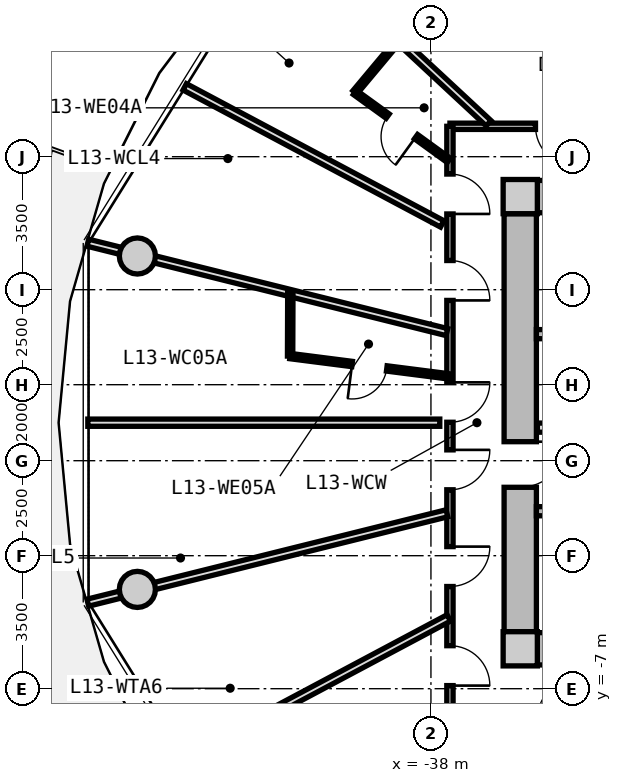
"""IFC4 building model, lengths in metres.
Left out: names, types, materials, properties, quantities, classifications, styles, units other than length and angle.
Written with IfcOpenShell. Run it as: python <this file> out.ifc"""

import sys

from ifc_helpers import new_model, si_unit, direction, frame, frame_2d, origin, origin_2d, place, context, subcontext, project, spatial, rectangle, circle, extrude, source, transform, mapped, element, fill, save


model = new_model("IFC4")
c1 = context("Model", 3, precision=1e-05, world=origin(), true_north=direction((0.0, 1.0)))
c2 = subcontext(c1, "Body", "Model", "MODEL_VIEW")
j1 = project(units=[si_unit("LENGTHUNIT", "METRE"), si_unit("PLANEANGLEUNIT", "RADIAN")], contexts=[c1])
p1 = place(None, origin())
s1 = spatial("IfcSite", under=j1, at=p1, CompositionType="ELEMENT")
p2 = place(p1, origin())
s2 = spatial("IfcBuilding", under=s1, at=p2, CompositionType="ELEMENT")
p3 = place(p2, frame((0.0, 0.0, 46.0)))
s3 = spatial("IfcBuildingStorey", under=s2, at=p3, CompositionType="ELEMENT", Elevation=46.0)
m1 = source(origin(), c2, "Body", "SweptSolid", [
    extrude(rectangle(XDim=0.9, YDim=0.9, at=origin_2d()), origin(), (0.0, 0.0, 1.0), 3.05),
])
for number, where, z_axis, x_axis in (
    (1, (-35.65, -5.95, 0.0), (0.0, 0.0, 1.0), (1.0, 0.0, 0.0)),
    (2, (-35.65, 5.95, 0.0), (0.0, 0.0, 1.0), (1.0, 0.0, 0.0)),
):
    element("IfcColumn", number, at=place(p3, frame(where, z_axis=z_axis, x_axis=x_axis)), inside=s3, PredefinedType="COLUMN", context=c2, shape_type="MappedRepresentation", body=[
        mapped(m1, transform((0.0, 0.0, 0.0), x_axis=(1.0, 0.0, 0.0), y_axis=(0.0, 1.0, 0.0), z_axis=(0.0, 0.0, 1.0), scale=1.0)),
    ])
m2 = source(origin(), c2, "Body", "SweptSolid", [
    extrude(rectangle(XDim=14.4, YDim=0.85, at=frame_2d((7.2, 0.0))), origin(), (0.0, 0.0, 1.0), 2.79),
])
for number, where, z_axis, x_axis in (
    (3, (-35.2, 5.95, 0.0), (0.0, 0.0, 1.0), (1.0, 0.0, 0.0)),
    (4, (-20.8, -5.95, 0.0), (0.0, 0.0, 1.0), (-1.0, 0.0, 0.0)),
):
    element("IfcWall", number, at=place(p3, frame(where, z_axis=z_axis, x_axis=x_axis)), inside=s3, PredefinedType="SHEAR", context=c2, shape_type="MappedRepresentation", body=[
        mapped(m2, transform((0.0, 0.0, 0.0), x_axis=(1.0, 0.0, 0.0), y_axis=(0.0, 1.0, 0.0), z_axis=(0.0, 0.0, 1.0), scale=1.0)),
    ])
m3 = source(origin(), c2, "Body", "SweptSolid", [
    extrude(rectangle(XDim=11.0, YDim=0.85, at=frame_2d((5.5, 0.0))), origin(), (0.0, 0.0, 1.0), 2.79),
])
p4 = place(p3, frame((-35.65, -5.5, 0.0), z_axis=(0.0, 0.0, 1.0), x_axis=(0.0, 1.0, 0.0)))
e5 = element("IfcWall", 5, at=p4, inside=s3, PredefinedType="SHEAR", context=c2, shape_type="MappedRepresentation", body=[
    mapped(m3, transform((0.0, 0.0, 0.0), x_axis=(1.0, 0.0, 0.0), y_axis=(0.0, 1.0, 0.0), z_axis=(0.0, 0.0, 1.0), scale=1.0)),
])
p5 = place(p4, frame((3.8, 0.0, 0.0)))
e6 = element("IfcOpeningElement", 6, at=p5, cuts=e5, PredefinedType="OPENING", context=c2, shape_type="SweptSolid", body=[
    extrude(rectangle(XDim=1.2, YDim=2.15, at=frame_2d((0.6, 1.075))), frame((0.0, 0.435, 0.0), z_axis=(0.0, -1.0, 0.0), x_axis=(1.0, 0.0, 0.0)), (0.0, 0.0, 1.0), 0.87),
])
m4 = source(origin(), c2, "Body", "SweptSolid", [
    extrude(circle(Radius=0.475, at=origin_2d()), origin(), (0.0, 0.0, 1.0), 3.05),
])
for number, where, z_axis, x_axis in (
    (7, (-45.725, 4.387, 0.0), (0.0, 0.0, 1.0), (1.0, 0.0, 0.0)),
    (8, (-45.725, -4.387, 0.0), (0.0, 0.0, 1.0), (1.0, 0.0, 0.0)),
):
    element("IfcColumn", number, at=place(p3, frame(where, z_axis=z_axis, x_axis=x_axis)), inside=s3, PredefinedType="COLUMN", context=c2, shape_type="MappedRepresentation", body=[
        mapped(m4, transform((0.0, 0.0, 0.0), x_axis=(1.0, 0.0, 0.0), y_axis=(0.0, 1.0, 0.0), z_axis=(0.0, 0.0, 1.0), scale=1.0)),
    ])
m5 = source(origin(), c2, "Body", "SweptSolid", [
    extrude(rectangle(XDim=7.765, YDim=0.24, at=frame_2d((3.883, 0.0))), origin(), (0.0, 0.0, 1.0), 2.79),
])
p6 = place(p3, frame((-35.225, 2.33, 0.0), z_axis=(0.0, 0.0, 1.0), x_axis=(1.0, 0.0, 0.0)))
e9 = element("IfcWall", 9, at=p6, inside=s3, PredefinedType="PARTITIONING", context=c2, shape_type="MappedRepresentation", body=[
    mapped(m5, transform((0.0, 0.0, 0.0), x_axis=(1.0, 0.0, 0.0), y_axis=(0.0, 1.0, 0.0), z_axis=(0.0, 0.0, 1.0), scale=1.0)),
])
p7 = place(p3, frame((-35.225, -2.33, 0.0), z_axis=(0.0, 0.0, 1.0), x_axis=(1.0, 0.0, 0.0)))
e10 = element("IfcWall", 10, at=p7, inside=s3, PredefinedType="PARTITIONING", context=c2, shape_type="MappedRepresentation", body=[
    mapped(m5, transform((0.0, 0.0, 0.0), x_axis=(1.0, 0.0, 0.0), y_axis=(0.0, 1.0, 0.0), z_axis=(0.0, 0.0, 1.0), scale=1.0)),
])
p8 = place(p7, frame((0.885, 0.0, 0.0)))
e11 = element("IfcOpeningElement", 11, at=p8, cuts=e10, PredefinedType="OPENING", context=c2, shape_type="SweptSolid", body=[
    extrude(rectangle(XDim=1.1, YDim=2.15, at=frame_2d((0.55, 1.075))), frame((0.0, 0.13, 0.0), z_axis=(0.0, -1.0, 0.0), x_axis=(1.0, 0.0, 0.0)), (0.0, 0.0, 1.0), 0.26),
])
m6 = source(origin(), c2, "Body", "SweptSolid", [
    extrude(rectangle(XDim=7.62, YDim=0.24, at=frame_2d((3.81, 0.0))), origin(), (0.0, 0.0, 1.0), 2.775),
])
p9 = place(p3, frame((-35.2, -0.13, 0.0), z_axis=(0.0, 0.0, 1.0), x_axis=(1.0, 0.0, 0.0)))
e12 = element("IfcWall", 12, at=p9, inside=s3, PredefinedType="PARTITIONING", context=c2, shape_type="MappedRepresentation", body=[
    mapped(m6, transform((0.0, 0.0, 0.0), x_axis=(1.0, 0.0, 0.0), y_axis=(0.0, 1.0, 0.0), z_axis=(0.0, 0.0, 1.0), scale=1.0)),
])
p10 = place(p9, frame((6.22, 0.0, 0.0)))
e13 = element("IfcOpeningElement", 13, at=p10, cuts=e12, PredefinedType="OPENING", context=c2, shape_type="SweptSolid", body=[
    extrude(rectangle(XDim=1.0, YDim=2.1, at=frame_2d((0.5, 1.05))), frame((0.0, 0.13, 0.0), z_axis=(0.0, -1.0, 0.0), x_axis=(1.0, 0.0, 0.0)), (0.0, 0.0, 1.0), 0.26),
])
p11 = place(p9, frame((0.85, 0.0, 0.0)))
e14 = element("IfcOpeningElement", 14, at=p11, cuts=e12, PredefinedType="OPENING", context=c2, shape_type="SweptSolid", body=[
    extrude(rectangle(XDim=1.1, YDim=2.2, at=frame_2d((0.55, 1.1))), frame((0.0, 0.13, 0.0), z_axis=(0.0, -1.0, 0.0), x_axis=(1.0, 0.0, 0.0)), (0.0, 0.0, 1.0), 0.26),
])
p12 = place(p9, frame((3.85, 0.0, 0.0)))
e15 = element("IfcOpeningElement", 15, at=p12, cuts=e12, PredefinedType="OPENING", context=c2, shape_type="SweptSolid", body=[
    extrude(rectangle(XDim=1.1, YDim=2.2, at=frame_2d((0.55, 1.1))), frame((0.0, 0.13, 0.0), z_axis=(0.0, -1.0, 0.0), x_axis=(1.0, 0.0, 0.0)), (0.0, 0.0, 1.0), 0.26),
])
m7 = source(origin(), c2, "Body", "SweptSolid", [
    extrude(rectangle(XDim=19.0, YDim=0.165, at=frame_2d((9.5, 0.0))), origin(), (0.0, 0.0, 1.0), 2.775),
])
p13 = place(p3, frame((-37.5, 7.8, 0.0), z_axis=(0.0, 0.0, 1.0), x_axis=(1.0, 0.0, 0.0)))
e16 = element("IfcWall", 16, at=p13, inside=s3, PredefinedType="PARTITIONING", context=c2, shape_type="MappedRepresentation", body=[
    mapped(m7, transform((0.0, 0.0, 0.0), x_axis=(1.0, 0.0, 0.0), y_axis=(0.0, 1.0, 0.0), z_axis=(0.0, 0.0, 1.0), scale=1.0)),
])
p14 = place(p13, frame((4.773, 0.0, 0.0)))
e17 = element("IfcOpeningElement", 17, at=p14, cuts=e16, PredefinedType="OPENING", context=c2, shape_type="SweptSolid", body=[
    extrude(rectangle(XDim=1.05, YDim=2.15, at=frame_2d((0.525, 1.075))), frame((0.0, 0.093, 0.0), z_axis=(0.0, -1.0, 0.0), x_axis=(1.0, 0.0, 0.0)), (0.0, 0.0, 1.0), 0.185),
])
p15 = place(p13, frame((2.251, 0.0, 0.0)))
e18 = element("IfcOpeningElement", 18, at=p15, cuts=e16, PredefinedType="OPENING", context=c2, shape_type="SweptSolid", body=[
    extrude(rectangle(XDim=1.05, YDim=2.15, at=frame_2d((0.525, 1.075))), frame((0.0, 0.093, 0.0), z_axis=(0.0, -1.0, 0.0), x_axis=(1.0, 0.0, 0.0)), (0.0, 0.0, 1.0), 0.185),
])
p16 = place(p13, frame((14.653, 0.0, 0.0)))
e19 = element("IfcOpeningElement", 19, at=p16, cuts=e16, PredefinedType="OPENING", context=c2, shape_type="SweptSolid", body=[
    extrude(rectangle(XDim=1.05, YDim=2.15, at=frame_2d((0.525, 1.075))), frame((0.0, 0.093, 0.0), z_axis=(0.0, -1.0, 0.0), x_axis=(1.0, 0.0, 0.0)), (0.0, 0.0, 1.0), 0.185),
])
p17 = place(p13, frame((12.5, 0.0, 0.0)))
e20 = element("IfcOpeningElement", 20, at=p17, cuts=e16, PredefinedType="OPENING", context=c2, shape_type="SweptSolid", body=[
    extrude(rectangle(XDim=1.05, YDim=2.15, at=frame_2d((0.525, 1.075))), frame((0.0, 0.093, 0.0), z_axis=(0.0, -1.0, 0.0), x_axis=(1.0, 0.0, 0.0)), (0.0, 0.0, 1.0), 0.185),
])
p18 = place(p13, frame((9.352, 0.0, 0.0)))
e21 = element("IfcOpeningElement", 21, at=p18, cuts=e16, PredefinedType="OPENING", context=c2, shape_type="SweptSolid", body=[
    extrude(rectangle(XDim=1.05, YDim=2.15, at=frame_2d((0.525, 1.075))), frame((0.0, 0.093, 0.0), z_axis=(0.0, -1.0, 0.0), x_axis=(1.0, 0.0, 0.0)), (0.0, 0.0, 1.0), 0.185),
])
p19 = place(p13, frame((7.806, 0.0, 0.0)))
e22 = element("IfcOpeningElement", 22, at=p19, cuts=e16, PredefinedType="OPENING", context=c2, shape_type="SweptSolid", body=[
    extrude(rectangle(XDim=1.05, YDim=2.15, at=frame_2d((0.525, 1.075))), frame((0.0, 0.093, 0.0), z_axis=(0.0, -1.0, 0.0), x_axis=(1.0, 0.0, 0.0)), (0.0, 0.0, 1.0), 0.185),
])
m8 = source(origin(), c2, "Body", "SweptSolid", [
    extrude(rectangle(XDim=15.6, YDim=0.165, at=frame_2d((7.8, 0.0))), origin(), (0.0, 0.0, 1.0), 2.775),
])
p20 = place(p3, frame((-37.5, -7.8, 0.0), z_axis=(0.0, 0.0, 1.0), x_axis=(0.0, 1.0, 0.0)))
e23 = element("IfcWall", 23, at=p20, inside=s3, PredefinedType="PARTITIONING", context=c2, shape_type="MappedRepresentation", body=[
    mapped(m8, transform((0.0, 0.0, 0.0), x_axis=(1.0, 0.0, 0.0), y_axis=(0.0, 1.0, 0.0), z_axis=(0.0, 0.0, 1.0), scale=1.0)),
])
p21 = place(p20, frame((13.293, 0.0, 0.0)))
e24 = element("IfcOpeningElement", 24, at=p21, cuts=e23, PredefinedType="OPENING", context=c2, shape_type="SweptSolid", body=[
    extrude(rectangle(XDim=1.05, YDim=2.15, at=frame_2d((0.525, 1.075))), frame((0.0, 0.093, 0.0), z_axis=(0.0, -1.0, 0.0), x_axis=(1.0, 0.0, 0.0)), (0.0, 0.0, 1.0), 0.185),
])
p22 = place(p20, frame((11.018, 0.0, 0.0)))
e25 = element("IfcOpeningElement", 25, at=p22, cuts=e23, PredefinedType="OPENING", context=c2, shape_type="SweptSolid", body=[
    extrude(rectangle(XDim=1.05, YDim=2.15, at=frame_2d((0.525, 1.075))), frame((0.0, 0.093, 0.0), z_axis=(0.0, -1.0, 0.0), x_axis=(1.0, 0.0, 0.0)), (0.0, 0.0, 1.0), 0.185),
])
p23 = place(p20, frame((7.812, 0.0, 0.0)))
e26 = element("IfcOpeningElement", 26, at=p23, cuts=e23, PredefinedType="OPENING", context=c2, shape_type="SweptSolid", body=[
    extrude(rectangle(XDim=1.05, YDim=2.15, at=frame_2d((0.525, 1.075))), frame((0.0, 0.093, 0.0), z_axis=(0.0, -1.0, 0.0), x_axis=(1.0, 0.0, 0.0)), (0.0, 0.0, 1.0), 0.185),
])
p24 = place(p20, frame((6.035, 0.0, 0.0)))
e27 = element("IfcOpeningElement", 27, at=p24, cuts=e23, PredefinedType="OPENING", context=c2, shape_type="SweptSolid", body=[
    extrude(rectangle(XDim=1.05, YDim=2.15, at=frame_2d((0.525, 1.075))), frame((0.0, 0.093, 0.0), z_axis=(0.0, -1.0, 0.0), x_axis=(1.0, 0.0, 0.0)), (0.0, 0.0, 1.0), 0.185),
])
p25 = place(p20, frame((3.489, 0.0, 0.0)))
e28 = element("IfcOpeningElement", 28, at=p25, cuts=e23, PredefinedType="OPENING", context=c2, shape_type="SweptSolid", body=[
    extrude(rectangle(XDim=1.05, YDim=2.15, at=frame_2d((0.525, 1.075))), frame((0.0, 0.093, 0.0), z_axis=(0.0, -1.0, 0.0), x_axis=(1.0, 0.0, 0.0)), (0.0, 0.0, 1.0), 0.185),
])
p26 = place(p20, frame((0.882, 0.0, 0.0)))
e29 = element("IfcOpeningElement", 29, at=p26, cuts=e23, PredefinedType="OPENING", context=c2, shape_type="SweptSolid", body=[
    extrude(rectangle(XDim=1.05, YDim=2.15, at=frame_2d((0.525, 1.075))), frame((0.0, 0.093, 0.0), z_axis=(0.0, -1.0, 0.0), x_axis=(1.0, 0.0, 0.0)), (0.0, 0.0, 1.0), 0.185),
])
m9 = source(origin(), c2, "Body", "SweptSolid", [
    extrude(rectangle(XDim=7.435, YDim=0.19, at=frame_2d((3.717, 0.0))), origin(), (0.0, 0.0, 1.0), 2.225),
])
p27 = place(p3, frame((-36.483, 7.88, 0.0), z_axis=(0.0, 0.0, 1.0), x_axis=(-0.732651956848, 0.680603489652, 0.0)))
e30 = element("IfcWall", 30, at=p27, inside=s3, PredefinedType="PARTITIONING", context=c2, shape_type="MappedRepresentation", body=[
    mapped(m9, transform((0.0, 0.0, 0.0), x_axis=(1.0, 0.0, 0.0), y_axis=(0.0, 1.0, 0.0), z_axis=(0.0, 0.0, 1.0), scale=1.0)),
])
m10 = source(origin(), c2, "Body", "SweptSolid", [
    extrude(rectangle(XDim=8.598, YDim=0.19, at=frame_2d((4.299, 0.0))), origin(), (0.0, 0.0, 1.0), 2.775),
])
p28 = place(p3, frame((-32.957, 8.017, 0.0), z_axis=(0.0, 0.0, 1.0), x_axis=(-0.530039776395, 0.847972779893, 0.0)))
e31 = element("IfcWall", 31, at=p28, inside=s3, PredefinedType="PARTITIONING", context=c2, shape_type="MappedRepresentation", body=[
    mapped(m10, transform((0.0, 0.0, 0.0), x_axis=(1.0, 0.0, 0.0), y_axis=(0.0, 1.0, 0.0), z_axis=(0.0, 0.0, 1.0), scale=1.0)),
])
m11 = source(origin(), c2, "Body", "SweptSolid", [
    extrude(rectangle(XDim=9.737, YDim=0.19, at=frame_2d((4.869, 0.0))), origin(), (0.0, 0.0, 1.0), 2.225),
])
p29 = place(p3, frame((-37.58, 2.385, 0.0), z_axis=(0.0, 0.0, 1.0), x_axis=(-0.970392716238, 0.241532557375, 0.0)))
e32 = element("IfcWall", 32, at=p29, inside=s3, PredefinedType="PARTITIONING", context=c2, shape_type="MappedRepresentation", body=[
    mapped(m11, transform((0.0, 0.0, 0.0), x_axis=(1.0, 0.0, 0.0), y_axis=(0.0, 1.0, 0.0), z_axis=(0.0, 0.0, 1.0), scale=1.0)),
])
m12 = source(origin(), c2, "Body", "SweptSolid", [
    extrude(rectangle(XDim=7.677, YDim=0.19, at=frame_2d((3.838, 0.0))), origin(), (0.0, 0.0, 1.0), 2.775),
])
p30 = place(p3, frame((-37.703, 5.231, 0.0), z_axis=(0.0, 0.0, 1.0), x_axis=(-0.882725057546, 0.469889851753, 0.0)))
e33 = element("IfcWall", 33, at=p30, inside=s3, PredefinedType="PARTITIONING", context=c2, shape_type="MappedRepresentation", body=[
    mapped(m12, transform((0.0, 0.0, 0.0), x_axis=(1.0, 0.0, 0.0), y_axis=(0.0, 1.0, 0.0), z_axis=(0.0, 0.0, 1.0), scale=1.0)),
])
m13 = source(origin(), c2, "Body", "SweptSolid", [
    extrude(rectangle(XDim=3.051, YDim=0.14, at=frame_2d((1.525, 0.0))), origin(), (0.0, 0.0, 1.0), 2.775),
])
p31 = place(p3, frame((-37.53, 6.903, 0.0), z_axis=(0.0, 0.0, 1.0), x_axis=(-0.809849031404, 0.586638343729, 0.0)))
e34 = element("IfcWall", 34, at=p31, inside=s3, PredefinedType="PARTITIONING", context=c2, shape_type="MappedRepresentation", body=[
    mapped(m13, transform((0.0, 0.0, 0.0), x_axis=(1.0, 0.0, 0.0), y_axis=(0.0, 1.0, 0.0), z_axis=(0.0, 0.0, 1.0), scale=1.0)),
])
p32 = place(p31, frame((1.065, 0.0, 0.0)))
e35 = element("IfcOpeningElement", 35, at=p32, cuts=e34, PredefinedType="OPENING", context=c2, shape_type="SweptSolid", body=[
    extrude(rectangle(XDim=0.92, YDim=2.1, at=frame_2d((0.46, 1.05))), frame((0.0, 0.08, 0.0), z_axis=(0.0, -1.0, 0.0), x_axis=(1.0, 0.0, 0.0)), (0.0, 0.0, 1.0), 0.16),
])
m14 = source(origin(), c2, "Body", "SweptSolid", [
    extrude(rectangle(XDim=1.84, YDim=0.14, at=frame_2d((0.92, 0.0))), origin(), (0.0, 0.0, 1.0), 2.415),
])
p33 = place(p3, frame((-40.0, 8.692, 0.0), z_axis=(0.0, 0.0, 1.0), x_axis=(0.641410397049, 0.767197955262, 0.0)))
e36 = element("IfcWall", 36, at=p33, inside=s3, PredefinedType="PARTITIONING", context=c2, shape_type="MappedRepresentation", body=[
    mapped(m14, transform((0.0, 0.0, 0.0), x_axis=(1.0, 0.0, 0.0), y_axis=(0.0, 1.0, 0.0), z_axis=(0.0, 0.0, 1.0), scale=1.0)),
])
p34 = place(p3, frame((-37.58, -2.385, 0.0), z_axis=(0.0, 0.0, 1.0), x_axis=(-0.970392716238, -0.241532557375, 0.0)))
e37 = element("IfcWall", 37, at=p34, inside=s3, PredefinedType="PARTITIONING", context=c2, shape_type="MappedRepresentation", body=[
    mapped(m11, transform((0.0, 0.0, 0.0), x_axis=(1.0, 0.0, 0.0), y_axis=(0.0, 1.0, 0.0), z_axis=(0.0, 0.0, 1.0), scale=1.0)),
])
m15 = source(origin(), c2, "Body", "SweptSolid", [
    extrude(rectangle(XDim=9.261, YDim=0.19, at=frame_2d((4.631, 0.0))), origin(), (0.0, 0.0, 1.0), 2.775),
])
p35 = place(p3, frame((-37.767, 0.0, 0.0), z_axis=(0.0, 0.0, 1.0), x_axis=(-1.0, 0.0, 0.0)))
e38 = element("IfcWall", 38, at=p35, inside=s3, PredefinedType="PARTITIONING", context=c2, shape_type="MappedRepresentation", body=[
    mapped(m15, transform((0.0, 0.0, 0.0), x_axis=(1.0, 0.0, 0.0), y_axis=(0.0, 1.0, 0.0), z_axis=(0.0, 0.0, 1.0), scale=1.0)),
])
m16 = source(origin(), c2, "Body", "SweptSolid", [
    extrude(rectangle(XDim=4.21, YDim=0.14, at=frame_2d((2.105, 0.0))), origin(), (0.0, 0.0, 1.0), 2.775),
])
p36 = place(p3, frame((-37.53, 1.219, 0.0), z_axis=(0.0, 0.0, 1.0), x_axis=(-0.991917821325, 0.126881975625, 0.0)))
e39 = element("IfcWall", 39, at=p36, inside=s3, PredefinedType="PARTITIONING", context=c2, shape_type="MappedRepresentation", body=[
    mapped(m16, transform((0.0, 0.0, 0.0), x_axis=(1.0, 0.0, 0.0), y_axis=(0.0, 1.0, 0.0), z_axis=(0.0, 0.0, 1.0), scale=1.0)),
])
p37 = place(p36, frame((1.645, 0.0, 0.0)))
e40 = element("IfcOpeningElement", 40, at=p37, cuts=e39, PredefinedType="OPENING", context=c2, shape_type="SweptSolid", body=[
    extrude(rectangle(XDim=0.92, YDim=2.1, at=frame_2d((0.46, 1.05))), frame((0.0, 0.08, 0.0), z_axis=(0.0, -1.0, 0.0), x_axis=(1.0, 0.0, 0.0)), (0.0, 0.0, 1.0), 0.16),
])
m17 = source(origin(), c2, "Body", "SweptSolid", [
    extrude(rectangle(XDim=1.675, YDim=0.14, at=frame_2d((0.837, 0.0))), origin(), (0.0, 0.0, 1.0), 2.775),
])
p38 = place(p3, frame((-41.706, 1.753, 0.0), z_axis=(0.0, 0.0, 1.0), x_axis=(0.003644821977, 0.999993357614, 0.0)))
e41 = element("IfcWall", 41, at=p38, inside=s3, PredefinedType="PARTITIONING", context=c2, shape_type="MappedRepresentation", body=[
    mapped(m17, transform((0.0, 0.0, 0.0), x_axis=(1.0, 0.0, 0.0), y_axis=(0.0, 1.0, 0.0), z_axis=(0.0, 0.0, 1.0), scale=1.0)),
])
m18 = source(origin(), c2, "Body", "SweptSolid", [
    extrude(rectangle(XDim=7.873, YDim=0.19, at=frame_2d((3.937, 0.0))), origin(), (0.0, 0.0, 1.0), 2.775),
])
p39 = place(p3, frame((-37.53, -5.138, 0.0), z_axis=(0.0, 0.0, 1.0), x_axis=(-0.882666052726, -0.470000680175, 0.0)))
e42 = element("IfcWall", 42, at=p39, inside=s3, PredefinedType="PARTITIONING", context=c2, shape_type="MappedRepresentation", body=[
    mapped(m18, transform((0.0, 0.0, 0.0), x_axis=(1.0, 0.0, 0.0), y_axis=(0.0, 1.0, 0.0), z_axis=(0.0, 0.0, 1.0), scale=1.0)),
])
m19 = source(origin(), c2, "Body", "SweptSolid", [
    extrude(rectangle(XDim=1.2, YDim=2.15, at=frame_2d((0.6, 1.075))), frame((0.0, 0.025, 0.0), z_axis=(0.0, -1.0, 0.0), x_axis=(1.0, 0.0, 0.0)), (0.0, 0.0, 1.0), 0.05),
])
p40 = place(p5, frame((1.2, 0.0, 0.0), z_axis=(0.0, 0.0, 1.0), x_axis=(-1.0, 0.0, 0.0)))
e43 = element("IfcDoor", 43, at=p40, inside=s3, OperationType="SINGLE_SWING_LEFT", PredefinedType="DOOR", context=c2, shape_type="MappedRepresentation", body=[
    mapped(m19, transform((0.0, 0.0, 0.0), x_axis=(1.0, 0.0, 0.0), y_axis=(0.0, 1.0, 0.0), z_axis=(0.0, 0.0, 1.0), scale=1.0)),
])
fill(e6, e43)
m20 = source(origin(), c2, "Body", "SweptSolid", [
    extrude(rectangle(XDim=1.05, YDim=2.15, at=frame_2d((0.525, 1.075))), frame((0.0, 0.025, 0.0), z_axis=(0.0, -1.0, 0.0), x_axis=(1.0, 0.0, 0.0)), (0.0, 0.0, 1.0), 0.05),
])
p41 = place(p15, frame((1.05, 0.0, 0.0), z_axis=(0.0, 0.0, 1.0), x_axis=(-1.0, 0.0, 0.0)))
e44 = element("IfcDoor", 44, at=p41, inside=s3, OperationType="SINGLE_SWING_LEFT", PredefinedType="DOOR", context=c2, shape_type="MappedRepresentation", body=[
    mapped(m20, transform((0.0, 0.0, 0.0), x_axis=(1.0, 0.0, 0.0), y_axis=(0.0, 1.0, 0.0), z_axis=(0.0, 0.0, 1.0), scale=1.0)),
])
fill(e18, e44)
p42 = place(p21, frame((1.05, 0.0, 0.0), z_axis=(0.0, 0.0, 1.0), x_axis=(-1.0, 0.0, 0.0)))
e45 = element("IfcDoor", 45, at=p42, inside=s3, OperationType="SINGLE_SWING_RIGHT", PredefinedType="DOOR", context=c2, shape_type="MappedRepresentation", body=[
    mapped(m20, transform((0.0, 0.0, 0.0), x_axis=(1.0, 0.0, 0.0), y_axis=(0.0, 1.0, 0.0), z_axis=(0.0, 0.0, 1.0), scale=1.0)),
])
fill(e24, e45)
m21 = source(origin(), c2, "Body", "SweptSolid", [
    extrude(rectangle(XDim=0.92, YDim=2.1, at=frame_2d((0.46, 1.05))), frame((0.0, 0.025, 0.0), z_axis=(0.0, -1.0, 0.0), x_axis=(1.0, 0.0, 0.0)), (0.0, 0.0, 1.0), 0.05),
])
p43 = place(p32, origin())
e46 = element("IfcDoor", 46, at=p43, inside=s3, OperationType="SINGLE_SWING_LEFT", PredefinedType="DOOR", context=c2, shape_type="MappedRepresentation", body=[
    mapped(m21, transform((0.0, 0.0, 0.0), x_axis=(1.0, 0.0, 0.0), y_axis=(0.0, 1.0, 0.0), z_axis=(0.0, 0.0, 1.0), scale=1.0)),
])
fill(e35, e46)
p44 = place(p22, frame((1.05, 0.0, 0.0), z_axis=(0.0, 0.0, 1.0), x_axis=(-1.0, 0.0, 0.0)))
e47 = element("IfcDoor", 47, at=p44, inside=s3, OperationType="SINGLE_SWING_RIGHT", PredefinedType="DOOR", context=c2, shape_type="MappedRepresentation", body=[
    mapped(m20, transform((0.0, 0.0, 0.0), x_axis=(1.0, 0.0, 0.0), y_axis=(0.0, 1.0, 0.0), z_axis=(0.0, 0.0, 1.0), scale=1.0)),
])
fill(e25, e47)
p45 = place(p23, frame((1.05, 0.0, 0.0), z_axis=(0.0, 0.0, 1.0), x_axis=(-1.0, 0.0, 0.0)))
e48 = element("IfcDoor", 48, at=p45, inside=s3, OperationType="SINGLE_SWING_LEFT", PredefinedType="DOOR", context=c2, shape_type="MappedRepresentation", body=[
    mapped(m20, transform((0.0, 0.0, 0.0), x_axis=(1.0, 0.0, 0.0), y_axis=(0.0, 1.0, 0.0), z_axis=(0.0, 0.0, 1.0), scale=1.0)),
])
fill(e26, e48)
p46 = place(p37, origin())
e49 = element("IfcDoor", 49, at=p46, inside=s3, OperationType="SINGLE_SWING_RIGHT", PredefinedType="DOOR", context=c2, shape_type="MappedRepresentation", body=[
    mapped(m21, transform((0.0, 0.0, 0.0), x_axis=(1.0, 0.0, 0.0), y_axis=(0.0, 1.0, 0.0), z_axis=(0.0, 0.0, 1.0), scale=1.0)),
])
fill(e40, e49)
p47 = place(p24, frame((1.05, 0.0, 0.0), z_axis=(0.0, 0.0, 1.0), x_axis=(-1.0, 0.0, 0.0)))
e50 = element("IfcDoor", 50, at=p47, inside=s3, OperationType="SINGLE_SWING_LEFT", PredefinedType="DOOR", context=c2, shape_type="MappedRepresentation", body=[
    mapped(m20, transform((0.0, 0.0, 0.0), x_axis=(1.0, 0.0, 0.0), y_axis=(0.0, 1.0, 0.0), z_axis=(0.0, 0.0, 1.0), scale=1.0)),
])
fill(e27, e50)
p48 = place(p25, frame((1.05, 0.0, 0.0), z_axis=(0.0, 0.0, 1.0), x_axis=(-1.0, 0.0, 0.0)))
e51 = element("IfcDoor", 51, at=p48, inside=s3, OperationType="SINGLE_SWING_LEFT", PredefinedType="DOOR", context=c2, shape_type="MappedRepresentation", body=[
    mapped(m20, transform((0.0, 0.0, 0.0), x_axis=(1.0, 0.0, 0.0), y_axis=(0.0, 1.0, 0.0), z_axis=(0.0, 0.0, 1.0), scale=1.0)),
])
fill(e28, e51)
p49 = place(p26, frame((1.05, 0.0, 0.0), z_axis=(0.0, 0.0, 1.0), x_axis=(-1.0, 0.0, 0.0)))
e52 = element("IfcDoor", 52, at=p49, inside=s3, OperationType="SINGLE_SWING_RIGHT", PredefinedType="DOOR", context=c2, shape_type="MappedRepresentation", body=[
    mapped(m20, transform((0.0, 0.0, 0.0), x_axis=(1.0, 0.0, 0.0), y_axis=(0.0, 1.0, 0.0), z_axis=(0.0, 0.0, 1.0), scale=1.0)),
])
fill(e29, e52)
save(model, sys.argv[1])
